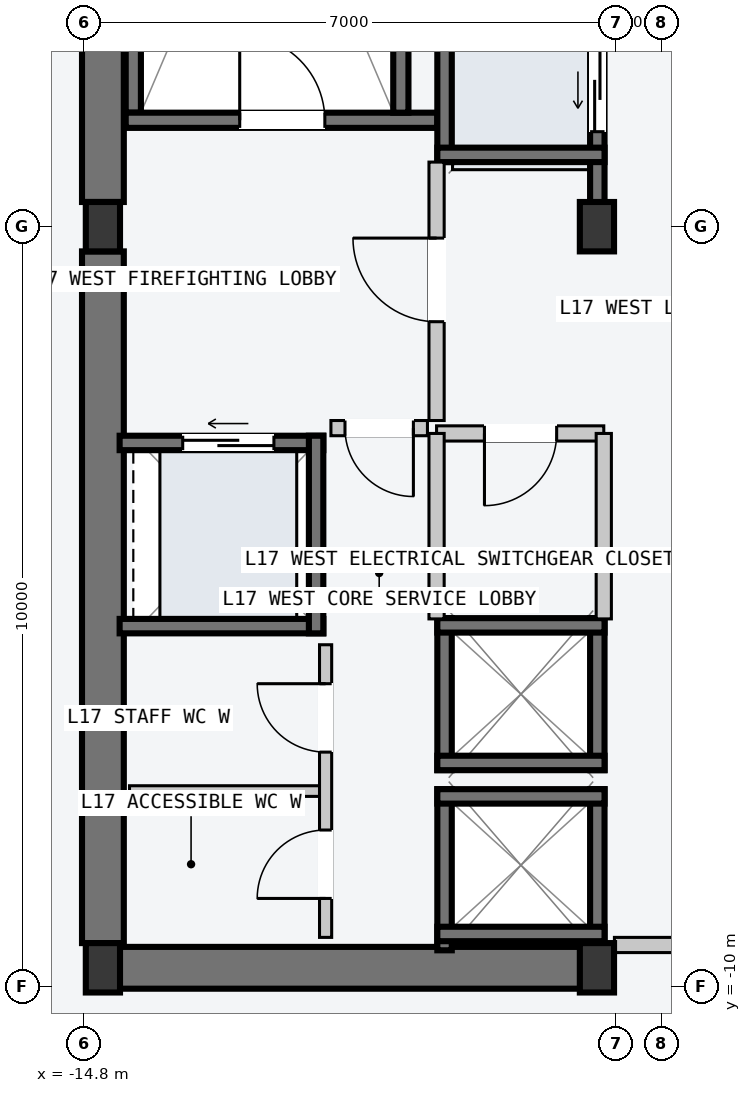
"""IFC4 building model, lengths in metres.
Left out: names, types, materials, properties, quantities, classifications, styles, units other than length and angle.
Written with IfcOpenShell. Run it as: python <this file> out.ifc"""

import sys

from ifc_helpers import new_model, si_unit, direction, frame, frame_2d, origin, origin_2d, place, context, subcontext, project, spatial, rectangle, i_section, extrude, element, fill, save


model = new_model("IFC4")
c1 = context("Model", 3, precision=1e-05, world=origin(), true_north=direction((0.0, 1.0)))
c2 = subcontext(c1, "Body", "Model", "MODEL_VIEW")
j1 = project(units=[si_unit("LENGTHUNIT", "METRE"), si_unit("PLANEANGLEUNIT", "RADIAN")], contexts=[c1])
p1 = place(None, origin())
s1 = spatial("IfcSite", under=j1, at=p1, CompositionType="ELEMENT")
p2 = place(p1, origin())
s2 = spatial("IfcBuilding", under=s1, at=p2, CompositionType="ELEMENT")
p3 = place(p2, frame((0.0, 0.0, 67.2)))
s3 = spatial("IfcBuildingStorey", under=s2, at=p3, CompositionType="ELEMENT", Elevation=67.2)
p4 = place(p3, frame((-14.53, -9.75, -0.2), z_axis=(0.0, 0.0, 1.0), x_axis=(1.0, 0.0, 0.0)))
e1 = element("IfcWall", 1, at=p4, inside=s3, PredefinedType="SHEAR", context=c2, shape_type="SweptSolid", body=[
    extrude(rectangle(XDim=6.46, YDim=0.55, at=frame_2d((3.23, 0.0))), origin(), (0.0, 0.0, 1.0), 3.6),
])
for number, where, z_axis, x_axis in (
    (2, (-14.55, -9.425, -0.2), (0.0, 0.0, 1.0), (0.0, 1.0, 0.0)),
    (3, (-14.55, 0.325, -0.2), (0.0, 0.0, 1.0), (0.0, 1.0, 0.0)),
):
    element("IfcWall", number, at=place(p3, frame(where, z_axis=z_axis, x_axis=x_axis)), inside=s3, PredefinedType="SHEAR", context=c2, shape_type="SweptSolid", body=[
        extrude(rectangle(XDim=9.1, YDim=0.55, at=frame_2d((4.55, 0.0))), origin(), (0.0, 0.0, 1.0), 3.6),
    ])
p5 = place(p3, frame((-14.15, 1.5, -0.2), z_axis=(0.0, 0.0, 1.0), x_axis=(0.0, 1.0, 0.0)))
e4 = element("IfcWall", 4, at=p5, inside=s3, PredefinedType="SOLIDWALL", context=c2, shape_type="SweptSolid", body=[
    extrude(rectangle(XDim=7.8, YDim=0.2, at=frame_2d((3.9, 0.0))), origin(), (0.0, 0.0, 1.0), 3.6),
])
p6 = place(p3, frame((-14.25, 1.4, -0.2), z_axis=(0.0, 0.0, 1.0), x_axis=(1.0, 0.0, 0.0)))
e5 = element("IfcWall", 5, at=p6, inside=s3, PredefinedType="SOLIDWALL", context=c2, shape_type="SweptSolid", body=[
    extrude(rectangle(XDim=4.1, YDim=0.2, at=frame_2d((2.05, 0.0))), origin(), (0.0, 0.0, 1.0), 3.6),
])
p7 = place(p6, frame((1.5, 0.0, 0.2)))
e6 = element("IfcOpeningElement", 6, at=p7, cuts=e5, PredefinedType="OPENING", context=c2, shape_type="SweptSolid", body=[
    extrude(rectangle(XDim=1.12, YDim=2.18, at=frame_2d((0.56, 1.09))), frame((0.0, 0.11, 0.0), z_axis=(0.0, -1.0, 0.0), x_axis=(1.0, 0.0, 0.0)), (0.0, 0.0, 1.0), 0.22),
])
p8 = place(p3, frame((-10.63, 1.5, -0.2), z_axis=(0.0, 0.0, 1.0), x_axis=(0.0, 1.0, 0.0)))
e7 = element("IfcWall", 7, at=p8, inside=s3, PredefinedType="SOLIDWALL", context=c2, shape_type="SweptSolid", body=[
    extrude(rectangle(XDim=7.8, YDim=0.2, at=frame_2d((3.9, 0.0))), origin(), (0.0, 0.0, 1.0), 3.6),
])
for number, where, z_axis, x_axis in (
    (8, (-14.55, -9.75, 0.0), (0.0, 0.0, 1.0), (1.0, 0.0, 0.0)),
    (9, (-14.55, 0.0, 0.0), (0.0, 0.0, 1.0), (1.0, 0.0, 0.0)),
    (10, (-8.05, -9.75, 0.0), (0.0, 0.0, 1.0), (1.0, 0.0, 0.0)),
    (11, (-8.05, 0.0, 0.0), (0.0, 0.0, 1.0), (1.0, 0.0, 0.0)),
):
    element("IfcColumn", number, at=place(p3, frame(where, z_axis=z_axis, x_axis=x_axis)), inside=s3, PredefinedType="COLUMN", context=c2, shape_type="SweptSolid", body=[
        extrude(i_section(OverallWidth=0.45, OverallDepth=0.65, WebThickness=0.025, FlangeThickness=0.04, at=origin_2d()), origin(), (0.0, 0.0, 1.0), 3.6),
    ])
p9 = place(p3, frame((-8.045, 0.21, -0.2), z_axis=(0.0, 0.0, 1.0), x_axis=(0.0, 1.0, 0.0)))
e12 = element("IfcWall", 12, at=p9, inside=s3, PredefinedType="SOLIDWALL", context=c2, shape_type="SweptSolid", body=[
    extrude(rectangle(XDim=2.54, YDim=0.19, at=frame_2d((1.27, 0.0))), origin(), (0.0, 0.0, 1.0), 3.6),
])
p10 = place(p9, frame((1.04, 0.0, 0.2)))
e13 = element("IfcOpeningElement", 13, at=p10, cuts=e12, PredefinedType="OPENING", context=c2, shape_type="SweptSolid", body=[
    extrude(rectangle(XDim=1.1, YDim=2.2, at=frame_2d((0.55, 1.1))), frame((0.0, 0.105, 0.0), z_axis=(0.0, -1.0, 0.0), x_axis=(1.0, 0.0, 0.0)), (0.0, 0.0, 1.0), 0.21),
])
p11 = place(p3, frame((-10.055, 0.85, -0.2), z_axis=(0.0, 0.0, 1.0), x_axis=(0.0, 1.0, 0.0)))
e14 = element("IfcWall", 14, at=p11, inside=s3, PredefinedType="SOLIDWALL", context=c2, shape_type="SweptSolid", body=[
    extrude(rectangle(XDim=1.9, YDim=0.19, at=frame_2d((0.95, 0.0))), origin(), (0.0, 0.0, 1.0), 3.6),
])
p12 = place(p3, frame((-10.15, 0.945, -0.2), z_axis=(0.0, 0.0, 1.0), x_axis=(1.0, 0.0, 0.0)))
e15 = element("IfcWall", 15, at=p12, inside=s3, PredefinedType="SOLIDWALL", context=c2, shape_type="SweptSolid", body=[
    extrude(rectangle(XDim=2.2, YDim=0.19, at=frame_2d((1.1, 0.0))), origin(), (0.0, 0.0, 1.0), 3.6),
])
for number, where, z_axis, x_axis in (
    (16, (-8.045, -9.52, -0.2), (0.0, 0.0, 1.0), (0.0, 1.0, 0.0)),
    (17, (-10.055, -9.52, -0.2), (0.0, 0.0, 1.0), (0.0, 1.0, 0.0)),
):
    element("IfcWall", number, at=place(p3, frame(where, z_axis=z_axis, x_axis=x_axis)), inside=s3, PredefinedType="SOLIDWALL", context=c2, shape_type="SweptSolid", body=[
        extrude(rectangle(XDim=2.12, YDim=0.19, at=frame_2d((1.06, 0.0))), origin(), (0.0, 0.0, 1.0), 3.6),
    ])
for number, where, z_axis, x_axis in (
    (18, (-10.15, -7.495, -0.2), (0.0, 0.0, 1.0), (1.0, 0.0, 0.0)),
    (19, (-10.15, -9.305, -0.2), (0.0, 0.0, 1.0), (1.0, 0.0, 0.0)),
):
    element("IfcWall", number, at=place(p3, frame(where, z_axis=z_axis, x_axis=x_axis)), inside=s3, PredefinedType="SOLIDWALL", context=c2, shape_type="SweptSolid", body=[
        extrude(rectangle(XDim=2.2, YDim=0.19, at=frame_2d((1.1, 0.0))), origin(), (0.0, 0.0, 1.0), 3.6),
    ])
for number, where, z_axis, x_axis in (
    (20, (-8.045, -7.15, -0.2), (0.0, 0.0, 1.0), (0.0, 1.0, 0.0)),
    (21, (-10.055, -7.15, -0.2), (0.0, 0.0, 1.0), (0.0, 1.0, 0.0)),
):
    element("IfcWall", number, at=place(p3, frame(where, z_axis=z_axis, x_axis=x_axis)), inside=s3, PredefinedType="SOLIDWALL", context=c2, shape_type="SweptSolid", body=[
        extrude(rectangle(XDim=2.0, YDim=0.19, at=frame_2d((1.0, 0.0))), origin(), (0.0, 0.0, 1.0), 3.6),
    ])
for number, where, z_axis, x_axis in (
    (22, (-10.15, -5.245, -0.2), (0.0, 0.0, 1.0), (1.0, 0.0, 0.0)),
    (23, (-10.15, -7.055, -0.2), (0.0, 0.0, 1.0), (1.0, 0.0, 0.0)),
):
    element("IfcWall", number, at=place(p3, frame(where, z_axis=z_axis, x_axis=x_axis)), inside=s3, PredefinedType="SOLIDWALL", context=c2, shape_type="SweptSolid", body=[
        extrude(rectangle(XDim=2.2, YDim=0.19, at=frame_2d((1.1, 0.0))), origin(), (0.0, 0.0, 1.0), 3.6),
    ])
p13 = place(p3, frame((-14.33, -2.845, -0.2), z_axis=(0.0, 0.0, 1.0), x_axis=(1.0, 0.0, 0.0)))
e24 = element("IfcWall", 24, at=p13, inside=s3, PredefinedType="SOLIDWALL", context=c2, shape_type="SweptSolid", body=[
    extrude(rectangle(XDim=2.68, YDim=0.19, at=frame_2d((1.34, 0.0))), origin(), (0.0, 0.0, 1.0), 3.6),
])
p14 = place(p13, frame((0.83, 0.0, 0.2)))
e25 = element("IfcOpeningElement", 25, at=p14, cuts=e24, PredefinedType="OPENING", context=c2, shape_type="SweptSolid", body=[
    extrude(rectangle(XDim=1.2, YDim=2.2, at=frame_2d((0.6, 1.1))), frame((0.0, 0.105, 0.0), z_axis=(0.0, -1.0, 0.0), x_axis=(1.0, 0.0, 0.0)), (0.0, 0.0, 1.0), 0.21),
])
p15 = place(p3, frame((-14.33, -5.255, -0.2), z_axis=(0.0, 0.0, 1.0), x_axis=(1.0, 0.0, 0.0)))
e26 = element("IfcWall", 26, at=p15, inside=s3, PredefinedType="SOLIDWALL", context=c2, shape_type="SweptSolid", body=[
    extrude(rectangle(XDim=2.68, YDim=0.19, at=frame_2d((1.34, 0.0))), origin(), (0.0, 0.0, 1.0), 3.6),
])
p16 = place(p3, frame((-11.745, -5.35, -0.2), z_axis=(0.0, 0.0, 1.0), x_axis=(0.0, 1.0, 0.0)))
e27 = element("IfcWall", 27, at=p16, inside=s3, PredefinedType="SOLIDWALL", context=c2, shape_type="SweptSolid", body=[
    extrude(rectangle(XDim=2.6, YDim=0.19, at=frame_2d((1.3, 0.0))), origin(), (0.0, 0.0, 1.0), 3.6),
])
p17 = place(p3, frame((-6.02, -9.45, 0.0), z_axis=(0.0, 0.0, 1.0), x_axis=(-1.0, 0.0, 0.0)))
e28 = element("IfcWall", 28, at=p17, inside=s3, PredefinedType="PARTITIONING", context=c2, shape_type="SweptSolid", body=[
    extrude(rectangle(XDim=1.8, YDim=0.2, at=frame_2d((0.9, 0.0))), origin(), (0.0, 0.0, 1.0), 3.4),
])
p18 = place(p3, frame((-10.16, -2.55, 0.0), z_axis=(0.0, 0.0, 1.0), x_axis=(0.0, 1.0, 0.0)))
e29 = element("IfcWall", 29, at=p18, inside=s3, PredefinedType="PARTITIONING", context=c2, shape_type="SweptSolid", body=[
    extrude(rectangle(XDim=3.4, YDim=0.2, at=frame_2d((1.7, 0.0))), origin(), (0.0, 0.0, 1.0), 3.4),
])
p19 = place(p18, frame((1.3, 0.0, 0.0)))
e30 = element("IfcOpeningElement", 30, at=p19, cuts=e29, PredefinedType="OPENING", context=c2, shape_type="SweptSolid", body=[
    extrude(rectangle(XDim=1.1, YDim=2.15, at=frame_2d((0.55, 1.075))), frame((0.0, 0.11, 0.0), z_axis=(0.0, -1.0, 0.0), x_axis=(1.0, 0.0, 0.0)), (0.0, 0.0, 1.0), 0.22),
])
p20 = place(p3, frame((-10.28, -2.65, 0.0), z_axis=(0.0, 0.0, 1.0), x_axis=(-1.0, 0.0, 0.0)))
e31 = element("IfcWall", 31, at=p20, inside=s3, PredefinedType="PARTITIONING", context=c2, shape_type="SweptSolid", body=[
    extrude(rectangle(XDim=1.27, YDim=0.2, at=frame_2d((0.635, 0.0))), origin(), (0.0, 0.0, 1.0), 3.4),
])
p21 = place(p20, frame((0.185, 0.0, 0.0)))
e32 = element("IfcOpeningElement", 32, at=p21, cuts=e31, PredefinedType="OPENING", context=c2, shape_type="SweptSolid", body=[
    extrude(rectangle(XDim=0.9, YDim=2.15, at=frame_2d((0.45, 1.075))), frame((0.0, 0.11, 0.0), z_axis=(0.0, -1.0, 0.0), x_axis=(1.0, 0.0, 0.0)), (0.0, 0.0, 1.0), 0.22),
])
p22 = place(p3, frame((-7.96, -2.72, 0.0), z_axis=(0.0, 0.0, 1.0), x_axis=(-1.0, 0.0, 0.0)))
e33 = element("IfcWall", 33, at=p22, inside=s3, PredefinedType="PARTITIONING", context=c2, shape_type="SweptSolid", body=[
    extrude(rectangle(XDim=2.2, YDim=0.2, at=frame_2d((1.1, 0.0))), origin(), (0.0, 0.0, 1.0), 3.4),
])
p23 = place(p22, frame((0.62, 0.0, 0.0)))
e34 = element("IfcOpeningElement", 34, at=p23, cuts=e33, PredefinedType="OPENING", context=c2, shape_type="SweptSolid", body=[
    extrude(rectangle(XDim=0.95, YDim=2.1, at=frame_2d((0.475, 1.05))), frame((0.0, 0.11, 0.0), z_axis=(0.0, -1.0, 0.0), x_axis=(1.0, 0.0, 0.0)), (0.0, 0.0, 1.0), 0.22),
])
for number, where, z_axis, x_axis in (
    (35, (-7.96, -5.16, 0.0), (0.0, 0.0, 1.0), (0.0, 1.0, 0.0)),
    (36, (-10.16, -5.16, 0.0), (0.0, 0.0, 1.0), (0.0, 1.0, 0.0)),
):
    element("IfcWall", number, at=place(p3, frame(where, z_axis=z_axis, x_axis=x_axis)), inside=s3, PredefinedType="PARTITIONING", context=c2, shape_type="SweptSolid", body=[
        extrude(rectangle(XDim=2.44, YDim=0.2, at=frame_2d((1.22, 0.0))), origin(), (0.0, 0.0, 1.0), 3.4),
    ])
p24 = place(p3, frame((-11.7, -7.425, 0.0), z_axis=(0.0, 0.0, 1.0), x_axis=(-1.0, 0.0, 0.0)))
e37 = element("IfcWall", 37, at=p24, inside=s3, PredefinedType="PARTITIONING", context=c2, shape_type="SweptSolid", body=[
    extrude(rectangle(XDim=2.5, YDim=0.14, at=frame_2d((1.25, 0.0))), origin(), (0.0, 0.0, 1.0), 3.4),
])
p25 = place(p3, frame((-11.62, -9.35, 0.0), z_axis=(0.0, 0.0, 1.0), x_axis=(0.0, 1.0, 0.0)))
e38 = element("IfcWall", 38, at=p25, inside=s3, PredefinedType="PARTITIONING", context=c2, shape_type="SweptSolid", body=[
    extrude(rectangle(XDim=3.85, YDim=0.16, at=frame_2d((1.925, 0.0))), origin(), (0.0, 0.0, 1.0), 3.4),
])
p26 = place(p25, frame((0.512, 0.0, 0.0)))
e39 = element("IfcOpeningElement", 39, at=p26, cuts=e38, PredefinedType="OPENING", context=c2, shape_type="SweptSolid", body=[
    extrude(rectangle(XDim=0.9, YDim=2.15, at=frame_2d((0.45, 1.075))), frame((0.0, 0.09, 0.0), z_axis=(0.0, -1.0, 0.0), x_axis=(1.0, 0.0, 0.0)), (0.0, 0.0, 1.0), 0.18),
])
p27 = place(p25, frame((2.438, 0.0, 0.0)))
e40 = element("IfcOpeningElement", 40, at=p27, cuts=e38, PredefinedType="OPENING", context=c2, shape_type="SweptSolid", body=[
    extrude(rectangle(XDim=0.9, YDim=2.15, at=frame_2d((0.45, 1.075))), frame((0.0, 0.09, 0.0), z_axis=(0.0, -1.0, 0.0), x_axis=(1.0, 0.0, 0.0)), (0.0, 0.0, 1.0), 0.18),
])
p28 = place(p7, origin())
e41 = element("IfcDoor", 41, at=p28, inside=s3, OperationType="SINGLE_SWING_LEFT", PredefinedType="DOOR", context=c2, shape_type="SweptSolid", body=[
    extrude(rectangle(XDim=1.12, YDim=2.18, at=frame_2d((0.56, 1.09))), frame((0.0, 0.025, 0.0), z_axis=(0.0, -1.0, 0.0), x_axis=(1.0, 0.0, 0.0)), (0.0, 0.0, 1.0), 0.05),
])
fill(e6, e41)
p29 = place(p10, origin())
e42 = element("IfcDoor", 42, at=p29, inside=s3, OperationType="SLIDING_TO_LEFT", PredefinedType="DOOR", context=c2, shape_type="SweptSolid", body=[
    extrude(rectangle(XDim=1.1, YDim=2.2, at=frame_2d((0.55, 1.1))), frame((0.0, 0.025, 0.0), z_axis=(0.0, -1.0, 0.0), x_axis=(1.0, 0.0, 0.0)), (0.0, 0.0, 1.0), 0.05),
])
fill(e13, e42)
p30 = place(p14, origin())
e43 = element("IfcDoor", 43, at=p30, inside=s3, OperationType="SLIDING_TO_LEFT", PredefinedType="DOOR", context=c2, shape_type="SweptSolid", body=[
    extrude(rectangle(XDim=1.2, YDim=2.2, at=frame_2d((0.6, 1.1))), frame((0.0, 0.025, 0.0), z_axis=(0.0, -1.0, 0.0), x_axis=(1.0, 0.0, 0.0)), (0.0, 0.0, 1.0), 0.05),
])
fill(e25, e43)
p31 = place(p19, origin())
e44 = element("IfcDoor", 44, at=p31, inside=s3, OperationType="SINGLE_SWING_RIGHT", PredefinedType="DOOR", context=c2, shape_type="SweptSolid", body=[
    extrude(rectangle(XDim=1.1, YDim=2.15, at=frame_2d((0.55, 1.075))), frame((0.0, 0.025, 0.0), z_axis=(0.0, -1.0, 0.0), x_axis=(1.0, 0.0, 0.0)), (0.0, 0.0, 1.0), 0.05),
])
fill(e30, e44)
p32 = place(p21, origin())
e45 = element("IfcDoor", 45, at=p32, inside=s3, OperationType="SINGLE_SWING_LEFT", PredefinedType="DOOR", context=c2, shape_type="SweptSolid", body=[
    extrude(rectangle(XDim=0.9, YDim=2.15, at=frame_2d((0.45, 1.075))), frame((0.0, 0.025, 0.0), z_axis=(0.0, -1.0, 0.0), x_axis=(1.0, 0.0, 0.0)), (0.0, 0.0, 1.0), 0.05),
])
fill(e32, e45)
p33 = place(p23, origin())
e46 = element("IfcDoor", 46, at=p33, inside=s3, OperationType="SINGLE_SWING_RIGHT", PredefinedType="DOOR", context=c2, shape_type="SweptSolid", body=[
    extrude(rectangle(XDim=0.95, YDim=2.1, at=frame_2d((0.475, 1.05))), frame((0.0, 0.025, 0.0), z_axis=(0.0, -1.0, 0.0), x_axis=(1.0, 0.0, 0.0)), (0.0, 0.0, 1.0), 0.05),
])
fill(e34, e46)
p34 = place(p26, origin())
e47 = element("IfcDoor", 47, at=p34, inside=s3, OperationType="SINGLE_SWING_LEFT", PredefinedType="DOOR", context=c2, shape_type="SweptSolid", body=[
    extrude(rectangle(XDim=0.9, YDim=2.15, at=frame_2d((0.45, 1.075))), frame((0.0, 0.025, 0.0), z_axis=(0.0, -1.0, 0.0), x_axis=(1.0, 0.0, 0.0)), (0.0, 0.0, 1.0), 0.05),
])
fill(e39, e47)
p35 = place(p27, origin())
e48 = element("IfcDoor", 48, at=p35, inside=s3, OperationType="SINGLE_SWING_RIGHT", PredefinedType="DOOR", context=c2, shape_type="SweptSolid", body=[
    extrude(rectangle(XDim=0.9, YDim=2.15, at=frame_2d((0.45, 1.075))), frame((0.0, 0.025, 0.0), z_axis=(0.0, -1.0, 0.0), x_axis=(1.0, 0.0, 0.0)), (0.0, 0.0, 1.0), 0.05),
])
fill(e40, e48)
save(model, sys.argv[1])
